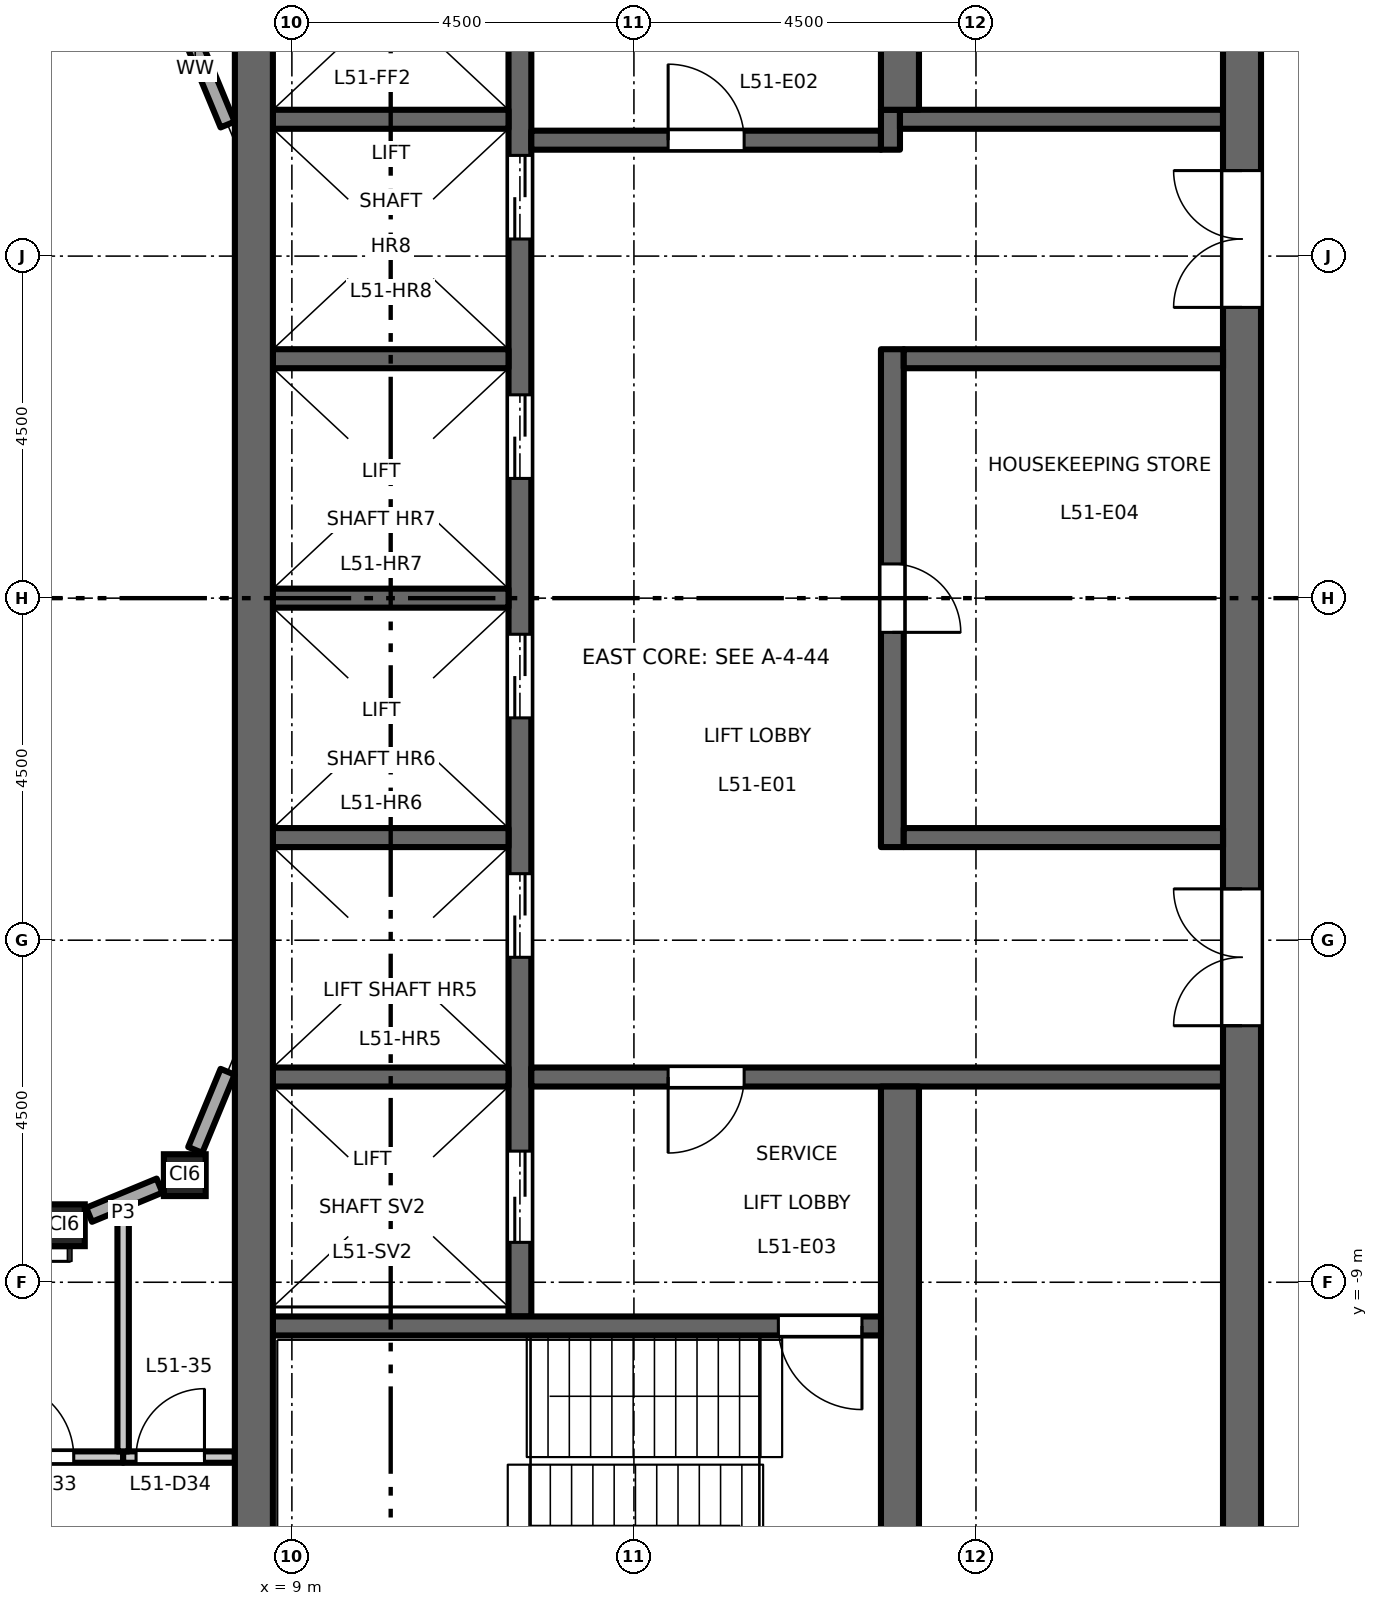
"""IFC4 building model, lengths in metres.
Left out: names, types, materials, properties, quantities, classifications, styles, units other than length and angle.
Written with IfcOpenShell. Run it as: python <this file> out.ifc"""

import sys

from ifc_helpers import new_model, si_unit, direction, frame, frame_2d, origin, origin_2d, place, context, subcontext, project, spatial, rectangle, hollow_rectangle, extrude, element, fill, save


model = new_model("IFC4")
c1 = context("Model", 3, precision=1e-05, world=origin(), true_north=direction((0.0, 1.0)))
c2 = subcontext(c1, "Body", "Model", "MODEL_VIEW")
j1 = project(units=[si_unit("LENGTHUNIT", "METRE"), si_unit("PLANEANGLEUNIT", "RADIAN")], contexts=[c1])
p1 = place(None, origin())
s1 = spatial("IfcSite", under=j1, at=p1, CompositionType="ELEMENT")
p2 = place(p1, origin())
s2 = spatial("IfcBuilding", under=s1, at=p2, CompositionType="ELEMENT")
p3 = place(p2, frame((0.0, 0.0, 237.7)))
s3 = spatial("IfcBuildingStorey", under=s2, at=p3, CompositionType="ELEMENT", Elevation=237.7)
for number, where, z_axis, x_axis in (
    (1, (6.0, -8.25, 0.0), (0.0, 0.0, 1.0), (1.0, 0.0, 0.0)),
    (2, (7.591, -7.591, 0.0), (0.0, 0.0, 1.0), (1.0, 0.0, 0.0)),
):
    element("IfcColumn", number, at=place(p3, frame(where, z_axis=z_axis, x_axis=x_axis)), inside=s3, PredefinedType="COLUMN", context=c2, shape_type="SweptSolid", body=[
        extrude(hollow_rectangle(XDim=0.55, YDim=0.55, WallThickness=0.028, at=origin_2d()), origin(), (0.0, 0.0, 1.0), 4.5),
    ])
p4 = place(p3, frame((12.0, -9.45, 0.0), z_axis=(0.0, 0.0, 1.0), x_axis=(0.0, 1.0, 0.0)))
e3 = element("IfcWall", 3, at=p4, inside=s3, PredefinedType="SHEAR", context=c2, shape_type="SweptSolid", body=[
    extrude(rectangle(XDim=18.9, YDim=0.3, at=frame_2d((9.45, 0.0))), origin(), (0.0, 0.0, 1.0), 4.35),
])
p5 = place(p4, frame((4.725, 0.0, 0.0)))
e4 = element("IfcOpeningElement", 4, at=p5, cuts=e3, PredefinedType="OPENING", context=c2, shape_type="SweptSolid", body=[
    extrude(rectangle(XDim=1.1, YDim=2.1, at=frame_2d((0.55, 1.05))), frame((0.0, 0.16, 0.0), z_axis=(0.0, -1.0, 0.0), x_axis=(1.0, 0.0, 0.0)), (0.0, 0.0, 1.0), 0.32),
])
p6 = place(p4, frame((7.875, 0.0, 0.0)))
e5 = element("IfcOpeningElement", 5, at=p6, cuts=e3, PredefinedType="OPENING", context=c2, shape_type="SweptSolid", body=[
    extrude(rectangle(XDim=1.1, YDim=2.1, at=frame_2d((0.55, 1.05))), frame((0.0, 0.16, 0.0), z_axis=(0.0, -1.0, 0.0), x_axis=(1.0, 0.0, 0.0)), (0.0, 0.0, 1.0), 0.32),
])
p7 = place(p4, frame((11.025, 0.0, 0.0)))
e6 = element("IfcOpeningElement", 6, at=p7, cuts=e3, PredefinedType="OPENING", context=c2, shape_type="SweptSolid", body=[
    extrude(rectangle(XDim=1.1, YDim=2.1, at=frame_2d((0.55, 1.05))), frame((0.0, 0.16, 0.0), z_axis=(0.0, -1.0, 0.0), x_axis=(1.0, 0.0, 0.0)), (0.0, 0.0, 1.0), 0.32),
])
p8 = place(p4, frame((14.175, 0.0, 0.0)))
e7 = element("IfcOpeningElement", 7, at=p8, cuts=e3, PredefinedType="OPENING", context=c2, shape_type="SweptSolid", body=[
    extrude(rectangle(XDim=1.1, YDim=2.1, at=frame_2d((0.55, 1.05))), frame((0.0, 0.16, 0.0), z_axis=(0.0, -1.0, 0.0), x_axis=(1.0, 0.0, 0.0)), (0.0, 0.0, 1.0), 0.32),
])
p9 = place(p4, frame((16.725, 0.0, 0.0)))
e8 = element("IfcOpeningElement", 8, at=p9, cuts=e3, PredefinedType="OPENING", context=c2, shape_type="SweptSolid", body=[
    extrude(rectangle(XDim=1.2, YDim=2.1, at=frame_2d((0.6, 1.05))), frame((0.0, 0.16, 0.0), z_axis=(0.0, -1.0, 0.0), x_axis=(1.0, 0.0, 0.0)), (0.0, 0.0, 1.0), 0.32),
])
p10 = place(p4, frame((0.975, 0.0, 0.0)))
e9 = element("IfcOpeningElement", 9, at=p10, cuts=e3, PredefinedType="OPENING", context=c2, shape_type="SweptSolid", body=[
    extrude(rectangle(XDim=1.2, YDim=2.1, at=frame_2d((0.6, 1.05))), frame((0.0, 0.16, 0.0), z_axis=(0.0, -1.0, 0.0), x_axis=(1.0, 0.0, 0.0)), (0.0, 0.0, 1.0), 0.32),
])
p11 = place(p3, frame((12.15, 6.025, 0.0), z_axis=(0.0, 0.0, 1.0), x_axis=(1.0, 0.0, 0.0)))
e10 = element("IfcWall", 10, at=p11, inside=s3, PredefinedType="SHEAR", context=c2, shape_type="SweptSolid", body=[
    extrude(rectangle(XDim=4.6, YDim=0.25, at=frame_2d((2.3, 0.0))), origin(), (0.0, 0.0, 1.0), 4.35),
])
p12 = place(p11, frame((1.8, 0.0, 0.0)))
e11 = element("IfcOpeningElement", 11, at=p12, cuts=e10, PredefinedType="OPENING", context=c2, shape_type="SweptSolid", body=[
    extrude(rectangle(XDim=1.0, YDim=2.1, at=frame_2d((0.5, 1.05))), frame((0.0, 0.135, 0.0), z_axis=(0.0, -1.0, 0.0), x_axis=(1.0, 0.0, 0.0)), (0.0, 0.0, 1.0), 0.27),
])
p13 = place(p3, frame((16.875, 5.9, 0.0), z_axis=(0.0, 0.0, 1.0), x_axis=(0.0, 1.0, 0.0)))
e12 = element("IfcWall", 12, at=p13, inside=s3, PredefinedType="SHEAR", context=c2, shape_type="SweptSolid", body=[
    extrude(rectangle(XDim=0.525, YDim=0.25, at=frame_2d((0.263, 0.0))), origin(), (0.0, 0.0, 1.0), 4.35),
])
p14 = place(p3, frame((17.0, 6.3, 0.0), z_axis=(0.0, 0.0, 1.0), x_axis=(1.0, 0.0, 0.0)))
e13 = element("IfcWall", 13, at=p14, inside=s3, PredefinedType="SHEAR", context=c2, shape_type="SweptSolid", body=[
    extrude(rectangle(XDim=4.25, YDim=0.25, at=frame_2d((2.125, 0.0))), origin(), (0.0, 0.0, 1.0), 4.35),
])
p15 = place(p3, frame((12.15, -6.3, 0.0), z_axis=(0.0, 0.0, 1.0), x_axis=(1.0, 0.0, 0.0)))
e14 = element("IfcWall", 14, at=p15, inside=s3, PredefinedType="SHEAR", context=c2, shape_type="SweptSolid", body=[
    extrude(rectangle(XDim=9.1, YDim=0.25, at=frame_2d((4.55, 0.0))), origin(), (0.0, 0.0, 1.0), 4.35),
])
p16 = place(p15, frame((1.8, 0.0, 0.0)))
e15 = element("IfcOpeningElement", 15, at=p16, cuts=e14, PredefinedType="OPENING", context=c2, shape_type="SweptSolid", body=[
    extrude(rectangle(XDim=1.0, YDim=2.1, at=frame_2d((0.5, 1.05))), frame((0.0, 0.135, 0.0), z_axis=(0.0, -1.0, 0.0), x_axis=(1.0, 0.0, 0.0)), (0.0, 0.0, 1.0), 0.27),
])
p17 = place(p3, frame((21.5, -13.0, 0.0), z_axis=(0.0, 0.0, 1.0), x_axis=(0.0, 1.0, 0.0)))
e16 = element("IfcWall", 16, at=p17, inside=s3, PredefinedType="SHEAR", context=c2, shape_type="SweptSolid", body=[
    extrude(rectangle(XDim=26.0, YDim=0.5, at=frame_2d((13.0, 0.0))), origin(), (0.0, 0.0, 1.0), 4.35),
])
p18 = place(p17, frame((16.825, 0.0, 0.0)))
e17 = element("IfcOpeningElement", 17, at=p18, cuts=e16, PredefinedType="OPENING", context=c2, shape_type="SweptSolid", body=[
    extrude(rectangle(XDim=1.8, YDim=2.1, at=frame_2d((0.9, 1.05))), frame((0.0, 0.26, 0.0), z_axis=(0.0, -1.0, 0.0), x_axis=(1.0, 0.0, 0.0)), (0.0, 0.0, 1.0), 0.52),
])
p19 = place(p17, frame((7.375, 0.0, 0.0)))
e18 = element("IfcOpeningElement", 18, at=p19, cuts=e16, PredefinedType="OPENING", context=c2, shape_type="SweptSolid", body=[
    extrude(rectangle(XDim=1.8, YDim=2.1, at=frame_2d((0.9, 1.05))), frame((0.0, 0.26, 0.0), z_axis=(0.0, -1.0, 0.0), x_axis=(1.0, 0.0, 0.0)), (0.0, 0.0, 1.0), 0.52),
])
p20 = place(p3, frame((16.9, -3.275, 0.0), z_axis=(0.0, 0.0, 1.0), x_axis=(0.0, 1.0, 0.0)))
e19 = element("IfcWall", 19, at=p20, inside=s3, PredefinedType="SHEAR", context=c2, shape_type="SweptSolid", body=[
    extrude(rectangle(XDim=6.55, YDim=0.3, at=frame_2d((3.275, 0.0))), origin(), (0.0, 0.0, 1.0), 4.35),
])
p21 = place(p20, frame((2.825, 0.0, 0.0)))
e20 = element("IfcOpeningElement", 20, at=p21, cuts=e19, PredefinedType="OPENING", context=c2, shape_type="SweptSolid", body=[
    extrude(rectangle(XDim=0.9, YDim=2.1, at=frame_2d((0.45, 1.05))), frame((0.0, 0.16, 0.0), z_axis=(0.0, -1.0, 0.0), x_axis=(1.0, 0.0, 0.0)), (0.0, 0.0, 1.0), 0.32),
])
for number, where, z_axis, x_axis in (
    (21, (17.05, 3.15, 0.0), (0.0, 0.0, 1.0), (1.0, 0.0, 0.0)),
    (22, (17.05, -3.15, 0.0), (0.0, 0.0, 1.0), (1.0, 0.0, 0.0)),
):
    element("IfcWall", number, at=place(p3, frame(where, z_axis=z_axis, x_axis=x_axis)), inside=s3, PredefinedType="SHEAR", context=c2, shape_type="SweptSolid", body=[
        extrude(rectangle(XDim=4.2, YDim=0.25, at=frame_2d((2.1, 0.0))), origin(), (0.0, 0.0, 1.0), 4.35),
    ])
for number, where, z_axis, x_axis in (
    (23, (17.0, 6.425, 0.0), (0.0, 0.0, 1.0), (0.0, 1.0, 0.0)),
    (24, (17.0, -13.0, 0.0), (0.0, 0.0, 1.0), (0.0, 1.0, 0.0)),
):
    element("IfcWall", number, at=place(p3, frame(where, z_axis=z_axis, x_axis=x_axis)), inside=s3, PredefinedType="SHEAR", context=c2, shape_type="SweptSolid", body=[
        extrude(rectangle(XDim=6.575, YDim=0.5, at=frame_2d((3.288, 0.0))), origin(), (0.0, 0.0, 1.0), 4.35),
    ])
for number, where, z_axis, x_axis in (
    (25, (8.75, 0.0, 0.0), (0.0, 0.0, 1.0), (1.0, 0.0, 0.0)),
    (26, (8.75, 3.15, 0.0), (0.0, 0.0, 1.0), (1.0, 0.0, 0.0)),
    (27, (8.75, 6.3, 0.0), (0.0, 0.0, 1.0), (1.0, 0.0, 0.0)),
    (28, (8.75, -3.15, 0.0), (0.0, 0.0, 1.0), (1.0, 0.0, 0.0)),
    (29, (8.75, -6.3, 0.0), (0.0, 0.0, 1.0), (1.0, 0.0, 0.0)),
):
    element("IfcWall", number, at=place(p3, frame(where, z_axis=z_axis, x_axis=x_axis)), inside=s3, PredefinedType="SHEAR", context=c2, shape_type="SweptSolid", body=[
        extrude(rectangle(XDim=3.1, YDim=0.25, at=frame_2d((1.55, 0.0))), origin(), (0.0, 0.0, 1.0), 4.35),
    ])
p22 = place(p3, frame((8.75, -9.575, 0.0), z_axis=(0.0, 0.0, 1.0), x_axis=(1.0, 0.0, 0.0)))
e30 = element("IfcWall", 30, at=p22, inside=s3, PredefinedType="SHEAR", context=c2, shape_type="SweptSolid", body=[
    extrude(rectangle(XDim=8.0, YDim=0.25, at=frame_2d((4.0, 0.0))), origin(), (0.0, 0.0, 1.0), 4.35),
])
p23 = place(p22, frame((6.65, 0.0, 0.0)))
e31 = element("IfcOpeningElement", 31, at=p23, cuts=e30, PredefinedType="OPENING", context=c2, shape_type="SweptSolid", body=[
    extrude(rectangle(XDim=1.1, YDim=2.1, at=frame_2d((0.55, 1.05))), frame((0.0, 0.135, 0.0), z_axis=(0.0, -1.0, 0.0), x_axis=(1.0, 0.0, 0.0)), (0.0, 0.0, 1.0), 0.27),
])
p24 = place(p3, frame((8.5, -13.0, 0.0), z_axis=(0.0, 0.0, 1.0), x_axis=(0.0, 1.0, 0.0)))
e32 = element("IfcWall", 32, at=p24, inside=s3, PredefinedType="SHEAR", context=c2, shape_type="SweptSolid", body=[
    extrude(rectangle(XDim=26.0, YDim=0.5, at=frame_2d((13.0, 0.0))), origin(), (0.0, 0.0, 1.0), 4.35),
])
p25 = place(p3, frame((6.332, -8.113, 0.0), z_axis=(0.0, 0.0, 1.0), x_axis=(0.923859650767, 0.382731427616, 0.0)))
e33 = element("IfcWall", 33, at=p25, inside=s3, PredefinedType="STANDARD", context=c2, shape_type="SweptSolid", body=[
    extrude(rectangle(XDim=1.003, YDim=0.2, at=frame_2d((0.502, 0.0))), origin(), (0.0, 0.0, 1.0), 3.918),
])
for number, where, z_axis, x_axis in (
    (34, (7.729, -7.259, 0.0), (0.0, 0.0, 1.0), (0.383, 0.924, 0.0)),
    (35, (8.154, 6.231, 0.0), (0.0, 0.0, 1.0), (-0.383, 0.924, 0.0)),
):
    element("IfcWall", number, at=place(p3, frame(where, z_axis=z_axis, x_axis=x_axis)), inside=s3, PredefinedType="STANDARD", context=c2, shape_type="SweptSolid", body=[
        extrude(rectangle(XDim=1.113, YDim=0.2, at=frame_2d((0.556, 0.0))), origin(), (0.0, 0.0, 1.0), 3.918),
    ])
p26 = place(p3, frame((-8.25, -11.3, 0.0), z_axis=(0.0, 0.0, 1.0), x_axis=(1.0, 0.0, 0.0)))
e36 = element("IfcWall", 36, at=p26, inside=s3, PredefinedType="PARTITIONING", context=c2, shape_type="SweptSolid", body=[
    extrude(rectangle(XDim=15.03, YDim=0.15, at=frame_2d((7.515, 0.0))), origin(), (0.0, 0.0, 1.0), 4.35),
])
p27 = place(p26, frame((4.35, 0.0, 0.0)))
e37 = element("IfcOpeningElement", 37, at=p27, cuts=e36, PredefinedType="OPENING", context=c2, shape_type="SweptSolid", body=[
    extrude(rectangle(XDim=1.0, YDim=2.1, at=frame_2d((0.5, 1.05))), frame((0.0, 0.085, 0.0), z_axis=(0.0, -1.0, 0.0), x_axis=(1.0, 0.0, 0.0)), (0.0, 0.0, 1.0), 0.17),
])
p28 = place(p26, frame((6.6, 0.0, 0.0)))
e38 = element("IfcOpeningElement", 38, at=p28, cuts=e36, PredefinedType="OPENING", context=c2, shape_type="SweptSolid", body=[
    extrude(rectangle(XDim=1.0, YDim=2.1, at=frame_2d((0.5, 1.05))), frame((0.0, 0.085, 0.0), z_axis=(0.0, -1.0, 0.0), x_axis=(1.0, 0.0, 0.0)), (0.0, 0.0, 1.0), 0.17),
])
p29 = place(p26, frame((13.38, 0.0, 0.0)))
e39 = element("IfcOpeningElement", 39, at=p29, cuts=e36, PredefinedType="OPENING", context=c2, shape_type="SweptSolid", body=[
    extrude(rectangle(XDim=1.0, YDim=2.1, at=frame_2d((0.5, 1.05))), frame((0.0, 0.085, 0.0), z_axis=(0.0, -1.0, 0.0), x_axis=(1.0, 0.0, 0.0)), (0.0, 0.0, 1.0), 0.17),
])
p30 = place(p3, frame((6.78, -11.3, 0.0), z_axis=(0.0, 0.0, 1.0), x_axis=(1.0, 0.0, 0.0)))
e40 = element("IfcWall", 40, at=p30, inside=s3, PredefinedType="PARTITIONING", context=c2, shape_type="SweptSolid", body=[
    extrude(rectangle(XDim=1.47, YDim=0.15, at=frame_2d((0.735, 0.0))), origin(), (0.0, 0.0, 1.0), 4.35),
])
p31 = place(p30, frame((0.17, 0.0, 0.0)))
e41 = element("IfcOpeningElement", 41, at=p31, cuts=e40, PredefinedType="OPENING", context=c2, shape_type="SweptSolid", body=[
    extrude(rectangle(XDim=0.9, YDim=2.1, at=frame_2d((0.45, 1.05))), frame((0.0, 0.085, 0.0), z_axis=(0.0, -1.0, 0.0), x_axis=(1.0, 0.0, 0.0)), (0.0, 0.0, 1.0), 0.17),
])
p32 = place(p3, frame((6.78, -11.225, 0.0), z_axis=(0.0, 0.0, 1.0), x_axis=(0.0, 1.0, 0.0)))
e42 = element("IfcWall", 42, at=p32, inside=s3, PredefinedType="PARTITIONING", context=c2, shape_type="SweptSolid", body=[
    extrude(rectangle(XDim=3.138, YDim=0.15, at=frame_2d((1.569, 0.0))), origin(), (0.0, 0.0, 1.0), 4.35),
])
p33 = place(p12, origin())
e43 = element("IfcDoor", 43, at=p33, inside=s3, OperationType="SINGLE_SWING_RIGHT", PredefinedType="DOOR", context=c2, shape_type="SweptSolid", body=[
    extrude(rectangle(XDim=1.0, YDim=2.1, at=frame_2d((0.5, 1.05))), frame((0.0, 0.025, 0.0), z_axis=(0.0, -1.0, 0.0), x_axis=(1.0, 0.0, 0.0)), (0.0, 0.0, 1.0), 0.05),
])
fill(e11, e43)
p34 = place(p16, origin())
e44 = element("IfcDoor", 44, at=p34, inside=s3, OperationType="SINGLE_SWING_LEFT", PredefinedType="DOOR", context=c2, shape_type="SweptSolid", body=[
    extrude(rectangle(XDim=1.0, YDim=2.1, at=frame_2d((0.5, 1.05))), frame((0.0, 0.025, 0.0), z_axis=(0.0, -1.0, 0.0), x_axis=(1.0, 0.0, 0.0)), (0.0, 0.0, 1.0), 0.05),
])
fill(e15, e44)
p35 = place(p23, origin())
e45 = element("IfcDoor", 45, at=p35, inside=s3, OperationType="SINGLE_SWING_RIGHT", PredefinedType="DOOR", context=c2, shape_type="SweptSolid", body=[
    extrude(rectangle(XDim=1.1, YDim=2.1, at=frame_2d((0.55, 1.05))), frame((0.0, 0.025, 0.0), z_axis=(0.0, -1.0, 0.0), x_axis=(1.0, 0.0, 0.0)), (0.0, 0.0, 1.0), 0.05),
])
fill(e31, e45)
p36 = place(p18, origin())
e46 = element("IfcDoor", 46, at=p36, inside=s3, OperationType="DOUBLE_DOOR_DOUBLE_SWING", PredefinedType="DOOR", context=c2, shape_type="SweptSolid", body=[
    extrude(rectangle(XDim=1.8, YDim=2.1, at=frame_2d((0.9, 1.05))), frame((0.0, 0.025, 0.0), z_axis=(0.0, -1.0, 0.0), x_axis=(1.0, 0.0, 0.0)), (0.0, 0.0, 1.0), 0.05),
])
fill(e17, e46)
p37 = place(p19, origin())
e47 = element("IfcDoor", 47, at=p37, inside=s3, OperationType="DOUBLE_DOOR_DOUBLE_SWING", PredefinedType="DOOR", context=c2, shape_type="SweptSolid", body=[
    extrude(rectangle(XDim=1.8, YDim=2.1, at=frame_2d((0.9, 1.05))), frame((0.0, 0.025, 0.0), z_axis=(0.0, -1.0, 0.0), x_axis=(1.0, 0.0, 0.0)), (0.0, 0.0, 1.0), 0.05),
])
fill(e18, e47)
p38 = place(p5, origin())
e48 = element("IfcDoor", 48, at=p38, inside=s3, OperationType="DOUBLE_DOOR_SLIDING", PredefinedType="DOOR", context=c2, shape_type="SweptSolid", body=[
    extrude(rectangle(XDim=1.1, YDim=2.1, at=frame_2d((0.55, 1.05))), frame((0.0, 0.025, 0.0), z_axis=(0.0, -1.0, 0.0), x_axis=(1.0, 0.0, 0.0)), (0.0, 0.0, 1.0), 0.05),
])
fill(e4, e48)
p39 = place(p6, origin())
e49 = element("IfcDoor", 49, at=p39, inside=s3, OperationType="DOUBLE_DOOR_SLIDING", PredefinedType="DOOR", context=c2, shape_type="SweptSolid", body=[
    extrude(rectangle(XDim=1.1, YDim=2.1, at=frame_2d((0.55, 1.05))), frame((0.0, 0.025, 0.0), z_axis=(0.0, -1.0, 0.0), x_axis=(1.0, 0.0, 0.0)), (0.0, 0.0, 1.0), 0.05),
])
fill(e5, e49)
p40 = place(p7, origin())
e50 = element("IfcDoor", 50, at=p40, inside=s3, OperationType="DOUBLE_DOOR_SLIDING", PredefinedType="DOOR", context=c2, shape_type="SweptSolid", body=[
    extrude(rectangle(XDim=1.1, YDim=2.1, at=frame_2d((0.55, 1.05))), frame((0.0, 0.025, 0.0), z_axis=(0.0, -1.0, 0.0), x_axis=(1.0, 0.0, 0.0)), (0.0, 0.0, 1.0), 0.05),
])
fill(e6, e50)
p41 = place(p8, origin())
e51 = element("IfcDoor", 51, at=p41, inside=s3, OperationType="DOUBLE_DOOR_SLIDING", PredefinedType="DOOR", context=c2, shape_type="SweptSolid", body=[
    extrude(rectangle(XDim=1.1, YDim=2.1, at=frame_2d((0.55, 1.05))), frame((0.0, 0.025, 0.0), z_axis=(0.0, -1.0, 0.0), x_axis=(1.0, 0.0, 0.0)), (0.0, 0.0, 1.0), 0.05),
])
fill(e7, e51)
p42 = place(p10, origin())
e52 = element("IfcDoor", 52, at=p42, inside=s3, OperationType="DOUBLE_DOOR_SLIDING", PredefinedType="DOOR", context=c2, shape_type="SweptSolid", body=[
    extrude(rectangle(XDim=1.2, YDim=2.1, at=frame_2d((0.6, 1.05))), frame((0.0, 0.025, 0.0), z_axis=(0.0, -1.0, 0.0), x_axis=(1.0, 0.0, 0.0)), (0.0, 0.0, 1.0), 0.05),
])
fill(e9, e52)
p43 = place(p21, origin())
e53 = element("IfcDoor", 53, at=p43, inside=s3, OperationType="SINGLE_SWING_LEFT", PredefinedType="DOOR", context=c2, shape_type="SweptSolid", body=[
    extrude(rectangle(XDim=0.9, YDim=2.1, at=frame_2d((0.45, 1.05))), frame((0.0, 0.025, 0.0), z_axis=(0.0, -1.0, 0.0), x_axis=(1.0, 0.0, 0.0)), (0.0, 0.0, 1.0), 0.05),
])
fill(e20, e53)
p44 = place(p29, origin())
e54 = element("IfcDoor", 54, at=p44, inside=s3, OperationType="SINGLE_SWING_LEFT", PredefinedType="DOOR", context=c2, shape_type="SweptSolid", body=[
    extrude(rectangle(XDim=1.0, YDim=2.1, at=frame_2d((0.5, 1.05))), frame((0.0, 0.025, 0.0), z_axis=(0.0, -1.0, 0.0), x_axis=(1.0, 0.0, 0.0)), (0.0, 0.0, 1.0), 0.05),
])
fill(e39, e54)
p45 = place(p31, origin())
e55 = element("IfcDoor", 55, at=p45, inside=s3, OperationType="SINGLE_SWING_RIGHT", PredefinedType="DOOR", context=c2, shape_type="SweptSolid", body=[
    extrude(rectangle(XDim=0.9, YDim=2.1, at=frame_2d((0.45, 1.05))), frame((0.0, 0.025, 0.0), z_axis=(0.0, -1.0, 0.0), x_axis=(1.0, 0.0, 0.0)), (0.0, 0.0, 1.0), 0.05),
])
fill(e41, e55)
save(model, sys.argv[1])
